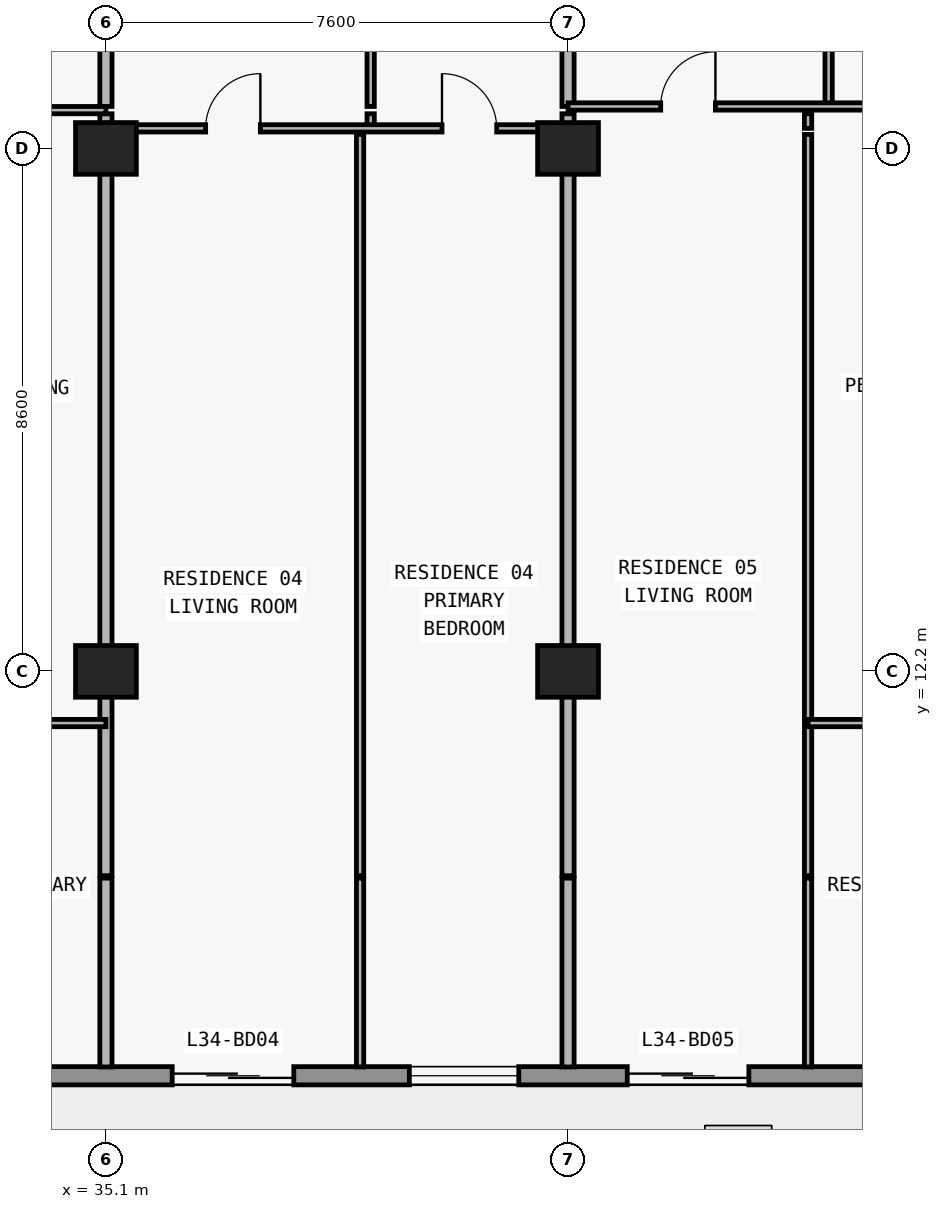
"""IFC4 building model, lengths in metres.
Left out: names, types, materials, properties, quantities, classifications, styles, units other than length and angle.
Written with IfcOpenShell. Run it as: python <this file> out.ifc"""

import sys

from ifc_helpers import new_model, si_unit, direction, frame, frame_2d, origin, origin_2d, place, context, subcontext, project, spatial, rectangle, extrude, element, fill, save


model = new_model("IFC4")
c1 = context("Model", 3, precision=1e-05, world=origin(), true_north=direction((0.0, 1.0)))
c2 = subcontext(c1, "Body", "Model", "MODEL_VIEW")
j1 = project(units=[si_unit("LENGTHUNIT", "METRE"), si_unit("PLANEANGLEUNIT", "RADIAN")], contexts=[c1])
p1 = place(None, origin())
s1 = spatial("IfcSite", under=j1, at=p1, CompositionType="ELEMENT")
p2 = place(p1, origin())
s2 = spatial("IfcBuilding", under=s1, at=p2, CompositionType="ELEMENT")
p3 = place(p2, frame((0.0, 0.0, 125.7)))
s3 = spatial("IfcBuildingStorey", under=s2, at=p3, CompositionType="ELEMENT", Elevation=125.7)
for number, where, z_axis, x_axis in (
    (1, (35.1, 12.2, 0.0), (0.0, 0.0, 1.0), (1.0, 0.0, 0.0)),
    (2, (42.7, 12.2, 0.0), (0.0, 0.0, 1.0), (1.0, 0.0, 0.0)),
    (3, (35.1, 20.8, 0.0), (0.0, 0.0, 1.0), (1.0, 0.0, 0.0)),
    (4, (42.7, 20.8, 0.0), (0.0, 0.0, 1.0), (1.0, 0.0, 0.0)),
):
    element("IfcColumn", number, at=place(p3, frame(where, z_axis=z_axis, x_axis=x_axis)), inside=s3, PredefinedType="COLUMN", context=c2, shape_type="SweptSolid", body=[
        extrude(rectangle(XDim=1.0, YDim=0.85, at=origin_2d()), origin(), (0.0, 0.0, 1.0), 3.05),
    ])
p4 = place(p3, frame((70.1, 5.55, 0.0), z_axis=(0.0, 0.0, 1.0), x_axis=(-1.0, 0.0, 0.0)))
e5 = element("IfcWall", 5, at=p4, inside=s3, PredefinedType="STANDARD", context=c2, shape_type="SweptSolid", body=[
    extrude(rectangle(XDim=62.4, YDim=0.3, at=frame_2d((31.2, 0.0))), origin(), (0.0, 0.0, 1.0), 3.05),
])
p5 = place(p4, frame((57.226, 0.0, 0.0)))
e6 = element("IfcOpeningElement", 6, at=p5, cuts=e5, PredefinedType="OPENING", context=c2, shape_type="SweptSolid", body=[
    extrude(rectangle(XDim=2.0, YDim=2.3, at=frame_2d((1.0, 1.15))), frame((0.0, 0.16, 0.0), z_axis=(0.0, -1.0, 0.0), x_axis=(1.0, 0.0, 0.0)), (0.0, 0.0, 1.0), 0.32),
])
p6 = place(p4, frame((52.926, 0.0, 0.85)))
e7 = element("IfcOpeningElement", 7, at=p6, cuts=e5, PredefinedType="OPENING", context=c2, shape_type="SweptSolid", body=[
    extrude(rectangle(XDim=2.2, YDim=1.55, at=frame_2d((1.1, 0.775))), frame((0.0, 0.16, 0.0), z_axis=(0.0, -1.0, 0.0), x_axis=(1.0, 0.0, 0.0)), (0.0, 0.0, 1.0), 0.32),
])
p7 = place(p4, frame((48.49, 0.0, 0.0)))
e8 = element("IfcOpeningElement", 8, at=p7, cuts=e5, PredefinedType="OPENING", context=c2, shape_type="SweptSolid", body=[
    extrude(rectangle(XDim=2.0, YDim=2.3, at=frame_2d((1.0, 1.15))), frame((0.0, 0.16, 0.0), z_axis=(0.0, -1.0, 0.0), x_axis=(1.0, 0.0, 0.0)), (0.0, 0.0, 1.0), 0.32),
])
p8 = place(p4, frame((44.39, 0.0, 0.85)))
e9 = element("IfcOpeningElement", 9, at=p8, cuts=e5, PredefinedType="OPENING", context=c2, shape_type="SweptSolid", body=[
    extrude(rectangle(XDim=1.8, YDim=1.55, at=frame_2d((0.9, 0.775))), frame((0.0, 0.16, 0.0), z_axis=(0.0, -1.0, 0.0), x_axis=(1.0, 0.0, 0.0)), (0.0, 0.0, 1.0), 0.32),
])
p9 = place(p4, frame((40.426, 0.0, 0.0)))
e10 = element("IfcOpeningElement", 10, at=p9, cuts=e5, PredefinedType="OPENING", context=c2, shape_type="SweptSolid", body=[
    extrude(rectangle(XDim=2.0, YDim=2.3, at=frame_2d((1.0, 1.15))), frame((0.0, 0.16, 0.0), z_axis=(0.0, -1.0, 0.0), x_axis=(1.0, 0.0, 0.0)), (0.0, 0.0, 1.0), 0.32),
])
p10 = place(p4, frame((36.126, 0.0, 0.85)))
e11 = element("IfcOpeningElement", 11, at=p10, cuts=e5, PredefinedType="OPENING", context=c2, shape_type="SweptSolid", body=[
    extrude(rectangle(XDim=2.2, YDim=1.55, at=frame_2d((1.1, 0.775))), frame((0.0, 0.16, 0.0), z_axis=(0.0, -1.0, 0.0), x_axis=(1.0, 0.0, 0.0)), (0.0, 0.0, 1.0), 0.32),
])
p11 = place(p4, frame((31.91, 0.0, 0.0)))
e12 = element("IfcOpeningElement", 12, at=p11, cuts=e5, PredefinedType="OPENING", context=c2, shape_type="SweptSolid", body=[
    extrude(rectangle(XDim=2.0, YDim=2.3, at=frame_2d((1.0, 1.15))), frame((0.0, 0.16, 0.0), z_axis=(0.0, -1.0, 0.0), x_axis=(1.0, 0.0, 0.0)), (0.0, 0.0, 1.0), 0.32),
])
p12 = place(p4, frame((28.21, 0.0, 0.85)))
e13 = element("IfcOpeningElement", 13, at=p12, cuts=e5, PredefinedType="OPENING", context=c2, shape_type="SweptSolid", body=[
    extrude(rectangle(XDim=1.8, YDim=1.55, at=frame_2d((0.9, 0.775))), frame((0.0, 0.16, 0.0), z_axis=(0.0, -1.0, 0.0), x_axis=(1.0, 0.0, 0.0)), (0.0, 0.0, 1.0), 0.32),
])
p13 = place(p4, frame((24.426, 0.0, 0.0)))
e14 = element("IfcOpeningElement", 14, at=p13, cuts=e5, PredefinedType="OPENING", context=c2, shape_type="SweptSolid", body=[
    extrude(rectangle(XDim=2.0, YDim=2.3, at=frame_2d((1.0, 1.15))), frame((0.0, 0.16, 0.0), z_axis=(0.0, -1.0, 0.0), x_axis=(1.0, 0.0, 0.0)), (0.0, 0.0, 1.0), 0.32),
])
p14 = place(p4, frame((20.126, 0.0, 0.85)))
e15 = element("IfcOpeningElement", 15, at=p14, cuts=e5, PredefinedType="OPENING", context=c2, shape_type="SweptSolid", body=[
    extrude(rectangle(XDim=2.2, YDim=1.55, at=frame_2d((1.1, 0.775))), frame((0.0, 0.16, 0.0), z_axis=(0.0, -1.0, 0.0), x_axis=(1.0, 0.0, 0.0)), (0.0, 0.0, 1.0), 0.32),
])
p15 = place(p4, frame((15.69, 0.0, 0.0)))
e16 = element("IfcOpeningElement", 16, at=p15, cuts=e5, PredefinedType="OPENING", context=c2, shape_type="SweptSolid", body=[
    extrude(rectangle(XDim=2.0, YDim=2.3, at=frame_2d((1.0, 1.15))), frame((0.0, 0.16, 0.0), z_axis=(0.0, -1.0, 0.0), x_axis=(1.0, 0.0, 0.0)), (0.0, 0.0, 1.0), 0.32),
])
p16 = place(p4, frame((11.59, 0.0, 0.85)))
e17 = element("IfcOpeningElement", 17, at=p16, cuts=e5, PredefinedType="OPENING", context=c2, shape_type="SweptSolid", body=[
    extrude(rectangle(XDim=1.8, YDim=1.55, at=frame_2d((0.9, 0.775))), frame((0.0, 0.16, 0.0), z_axis=(0.0, -1.0, 0.0), x_axis=(1.0, 0.0, 0.0)), (0.0, 0.0, 1.0), 0.32),
])
p17 = place(p4, frame((7.626, 0.0, 0.0)))
e18 = element("IfcOpeningElement", 18, at=p17, cuts=e5, PredefinedType="OPENING", context=c2, shape_type="SweptSolid", body=[
    extrude(rectangle(XDim=2.0, YDim=2.3, at=frame_2d((1.0, 1.15))), frame((0.0, 0.16, 0.0), z_axis=(0.0, -1.0, 0.0), x_axis=(1.0, 0.0, 0.0)), (0.0, 0.0, 1.0), 0.32),
])
p18 = place(p4, frame((3.326, 0.0, 0.85)))
e19 = element("IfcOpeningElement", 19, at=p18, cuts=e5, PredefinedType="OPENING", context=c2, shape_type="SweptSolid", body=[
    extrude(rectangle(XDim=2.2, YDim=1.55, at=frame_2d((1.1, 0.775))), frame((0.0, 0.16, 0.0), z_axis=(0.0, -1.0, 0.0), x_axis=(1.0, 0.0, 0.0)), (0.0, 0.0, 1.0), 0.32),
])
p19 = place(p3, frame((35.1, 5.695, 0.0), z_axis=(0.0, 0.0, 1.0), x_axis=(0.0, 1.0, 0.0)))
e20 = element("IfcWall", 20, at=p19, inside=s3, PredefinedType="PARTITIONING", context=c2, shape_type="SweptSolid", body=[
    extrude(rectangle(XDim=3.105, YDim=0.2, at=frame_2d((1.552, 0.0))), origin(), (0.0, 0.0, 1.0), 3.05),
])
p20 = place(p3, frame((35.1, 8.84, 0.0), z_axis=(0.0, 0.0, 1.0), x_axis=(0.0, 1.0, 0.0)))
e21 = element("IfcWall", 21, at=p20, inside=s3, PredefinedType="PARTITIONING", context=c2, shape_type="SweptSolid", body=[
    extrude(rectangle(XDim=12.19, YDim=0.2, at=frame_2d((6.095, 0.0))), origin(), (0.0, 0.0, 1.0), 2.174),
])
p21 = place(p3, frame((35.1, 21.13, 0.0), z_axis=(0.0, 0.0, 1.0), x_axis=(0.0, 1.0, 0.0)))
e22 = element("IfcWall", 22, at=p21, inside=s3, PredefinedType="PARTITIONING", context=c2, shape_type="SweptSolid", body=[
    extrude(rectangle(XDim=0.24, YDim=0.2, at=frame_2d((0.12, 0.0))), origin(), (0.0, 0.0, 1.0), 2.174),
])
p22 = place(p3, frame((35.1, 21.49, 0.0), z_axis=(0.0, 0.0, 1.0), x_axis=(0.0, 1.0, 0.0)))
e23 = element("IfcWall", 23, at=p22, inside=s3, PredefinedType="PARTITIONING", context=c2, shape_type="SweptSolid", body=[
    extrude(rectangle(XDim=4.69, YDim=0.2, at=frame_2d((2.345, 0.0))), origin(), (0.0, 0.0, 1.0), 2.174),
])
p23 = place(p3, frame((39.28, 5.695, 0.0), z_axis=(0.0, 0.0, 1.0), x_axis=(0.0, 1.0, 0.0)))
e24 = element("IfcWall", 24, at=p23, inside=s3, PredefinedType="PARTITIONING", context=c2, shape_type="SweptSolid", body=[
    extrude(rectangle(XDim=3.105, YDim=0.12, at=frame_2d((1.552, 0.0))), origin(), (0.0, 0.0, 1.0), 3.05),
])
p24 = place(p3, frame((39.28, 8.84, 0.0), z_axis=(0.0, 0.0, 1.0), x_axis=(0.0, 1.0, 0.0)))
e25 = element("IfcWall", 25, at=p24, inside=s3, PredefinedType="PARTITIONING", context=c2, shape_type="SweptSolid", body=[
    extrude(rectangle(XDim=12.19, YDim=0.12, at=frame_2d((6.095, 0.0))), origin(), (0.0, 0.0, 1.0), 3.05),
])
p25 = place(p3, frame((39.454, 21.13, 0.0), z_axis=(0.0, 0.0, 1.0), x_axis=(0.0, 1.0, 0.0)))
e26 = element("IfcWall", 26, at=p25, inside=s3, PredefinedType="PARTITIONING", context=c2, shape_type="SweptSolid", body=[
    extrude(rectangle(XDim=0.24, YDim=0.12, at=frame_2d((0.12, 0.0))), origin(), (0.0, 0.0, 1.0), 3.05),
])
p26 = place(p3, frame((39.454, 21.49, 0.0), z_axis=(0.0, 0.0, 1.0), x_axis=(0.0, 1.0, 0.0)))
e27 = element("IfcWall", 27, at=p26, inside=s3, PredefinedType="PARTITIONING", context=c2, shape_type="SweptSolid", body=[
    extrude(rectangle(XDim=4.69, YDim=0.12, at=frame_2d((2.345, 0.0))), origin(), (0.0, 0.0, 1.0), 3.05),
])
p27 = place(p26, frame((1.895, 0.0, 0.0)))
e28 = element("IfcOpeningElement", 28, at=p27, cuts=e27, PredefinedType="OPENING", context=c2, shape_type="SweptSolid", body=[
    extrude(rectangle(XDim=0.9, YDim=2.15, at=frame_2d((0.45, 1.075))), frame((0.0, 0.07, 0.0), z_axis=(0.0, -1.0, 0.0), x_axis=(1.0, 0.0, 0.0)), (0.0, 0.0, 1.0), 0.14),
])
p28 = place(p3, frame((42.7, 5.695, 0.0), z_axis=(0.0, 0.0, 1.0), x_axis=(0.0, 1.0, 0.0)))
e29 = element("IfcWall", 29, at=p28, inside=s3, PredefinedType="PARTITIONING", context=c2, shape_type="SweptSolid", body=[
    extrude(rectangle(XDim=3.105, YDim=0.2, at=frame_2d((1.552, 0.0))), origin(), (0.0, 0.0, 1.0), 3.05),
])
p29 = place(p3, frame((42.7, 8.84, 0.0), z_axis=(0.0, 0.0, 1.0), x_axis=(0.0, 1.0, 0.0)))
e30 = element("IfcWall", 30, at=p29, inside=s3, PredefinedType="PARTITIONING", context=c2, shape_type="SweptSolid", body=[
    extrude(rectangle(XDim=12.19, YDim=0.2, at=frame_2d((6.095, 0.0))), origin(), (0.0, 0.0, 1.0), 2.174),
])
p30 = place(p3, frame((42.7, 21.13, 0.0), z_axis=(0.0, 0.0, 1.0), x_axis=(0.0, 1.0, 0.0)))
e31 = element("IfcWall", 31, at=p30, inside=s3, PredefinedType="PARTITIONING", context=c2, shape_type="SweptSolid", body=[
    extrude(rectangle(XDim=0.24, YDim=0.2, at=frame_2d((0.12, 0.0))), origin(), (0.0, 0.0, 1.0), 2.174),
])
p31 = place(p3, frame((42.7, 21.49, 0.0), z_axis=(0.0, 0.0, 1.0), x_axis=(0.0, 1.0, 0.0)))
e32 = element("IfcWall", 32, at=p31, inside=s3, PredefinedType="PARTITIONING", context=c2, shape_type="SweptSolid", body=[
    extrude(rectangle(XDim=4.69, YDim=0.2, at=frame_2d((2.345, 0.0))), origin(), (0.0, 0.0, 1.0), 2.174),
])
p32 = place(p3, frame((46.648, 5.695, 0.0), z_axis=(0.0, 0.0, 1.0), x_axis=(0.0, 1.0, 0.0)))
e33 = element("IfcWall", 33, at=p32, inside=s3, PredefinedType="PARTITIONING", context=c2, shape_type="SweptSolid", body=[
    extrude(rectangle(XDim=3.105, YDim=0.12, at=frame_2d((1.552, 0.0))), origin(), (0.0, 0.0, 1.0), 3.05),
])
p33 = place(p3, frame((46.648, 8.84, 0.0), z_axis=(0.0, 0.0, 1.0), x_axis=(0.0, 1.0, 0.0)))
e34 = element("IfcWall", 34, at=p33, inside=s3, PredefinedType="PARTITIONING", context=c2, shape_type="SweptSolid", body=[
    extrude(rectangle(XDim=12.19, YDim=0.12, at=frame_2d((6.095, 0.0))), origin(), (0.0, 0.0, 1.0), 3.05),
])
p34 = place(p3, frame((46.648, 21.13, 0.0), z_axis=(0.0, 0.0, 1.0), x_axis=(0.0, 1.0, 0.0)))
e35 = element("IfcWall", 35, at=p34, inside=s3, PredefinedType="PARTITIONING", context=c2, shape_type="SweptSolid", body=[
    extrude(rectangle(XDim=0.24, YDim=0.12, at=frame_2d((0.12, 0.0))), origin(), (0.0, 0.0, 1.0), 3.05),
])
p35 = place(p3, frame((46.986, 21.49, 0.0), z_axis=(0.0, 0.0, 1.0), x_axis=(0.0, 1.0, 0.0)))
e36 = element("IfcWall", 36, at=p35, inside=s3, PredefinedType="PARTITIONING", context=c2, shape_type="SweptSolid", body=[
    extrude(rectangle(XDim=4.69, YDim=0.12, at=frame_2d((2.345, 0.0))), origin(), (0.0, 0.0, 1.0), 3.05),
])
p36 = place(p35, frame((1.895, 0.0, 0.0)))
e37 = element("IfcOpeningElement", 37, at=p36, cuts=e36, PredefinedType="OPENING", context=c2, shape_type="SweptSolid", body=[
    extrude(rectangle(XDim=0.9, YDim=2.15, at=frame_2d((0.45, 1.075))), frame((0.0, 0.07, 0.0), z_axis=(0.0, -1.0, 0.0), x_axis=(1.0, 0.0, 0.0)), (0.0, 0.0, 1.0), 0.14),
])
p37 = place(p3, frame((30.648, 11.35, 0.0), z_axis=(0.0, 0.0, 1.0), x_axis=(1.0, 0.0, 0.0)))
e38 = element("IfcWall", 38, at=p37, inside=s3, PredefinedType="PARTITIONING", context=c2, shape_type="SweptSolid", body=[
    extrude(rectangle(XDim=4.452, YDim=0.12, at=frame_2d((2.226, 0.0))), origin(), (0.0, 0.0, 1.0), 3.05),
])
p38 = place(p37, frame((1.776, 0.0, 0.0)))
e39 = element("IfcOpeningElement", 39, at=p38, cuts=e38, PredefinedType="OPENING", context=c2, shape_type="SweptSolid", body=[
    extrude(rectangle(XDim=0.9, YDim=2.15, at=frame_2d((0.45, 1.075))), frame((0.0, 0.07, 0.0), z_axis=(0.0, -1.0, 0.0), x_axis=(1.0, 0.0, 0.0)), (0.0, 0.0, 1.0), 0.14),
])
p39 = place(p3, frame((46.648, 11.35, 0.0), z_axis=(0.0, 0.0, 1.0), x_axis=(1.0, 0.0, 0.0)))
e40 = element("IfcWall", 40, at=p39, inside=s3, PredefinedType="PARTITIONING", context=c2, shape_type="SweptSolid", body=[
    extrude(rectangle(XDim=4.452, YDim=0.12, at=frame_2d((2.226, 0.0))), origin(), (0.0, 0.0, 1.0), 3.05),
])
p40 = place(p39, frame((1.776, 0.0, 0.0)))
e41 = element("IfcOpeningElement", 41, at=p40, cuts=e40, PredefinedType="OPENING", context=c2, shape_type="SweptSolid", body=[
    extrude(rectangle(XDim=0.9, YDim=2.15, at=frame_2d((0.45, 1.075))), frame((0.0, 0.07, 0.0), z_axis=(0.0, -1.0, 0.0), x_axis=(1.0, 0.0, 0.0)), (0.0, 0.0, 1.0), 0.14),
])
p41 = place(p3, frame((35.1, 21.13, 0.0), z_axis=(0.0, 0.0, 1.0), x_axis=(1.0, 0.0, 0.0)))
e42 = element("IfcWall", 42, at=p41, inside=s3, PredefinedType="PARTITIONING", context=c2, shape_type="SweptSolid", body=[
    extrude(rectangle(XDim=7.6, YDim=0.12, at=frame_2d((3.8, 0.0))), origin(), (0.0, 0.0, 1.0), 2.174),
])
p42 = place(p41, frame((1.64, 0.0, 0.0)))
e43 = element("IfcOpeningElement", 43, at=p42, cuts=e42, PredefinedType="OPENING", context=c2, shape_type="SweptSolid", body=[
    extrude(rectangle(XDim=0.9, YDim=2.124, at=frame_2d((0.45, 1.062))), frame((0.0, 0.07, 0.0), z_axis=(0.0, -1.0, 0.0), x_axis=(1.0, 0.0, 0.0)), (0.0, 0.0, 1.0), 0.14),
])
p43 = place(p41, frame((5.527, 0.0, 0.0)))
e44 = element("IfcOpeningElement", 44, at=p43, cuts=e42, PredefinedType="OPENING", context=c2, shape_type="SweptSolid", body=[
    extrude(rectangle(XDim=0.9, YDim=2.124, at=frame_2d((0.45, 1.062))), frame((0.0, 0.07, 0.0), z_axis=(0.0, -1.0, 0.0), x_axis=(1.0, 0.0, 0.0)), (0.0, 0.0, 1.0), 0.14),
])
p44 = place(p3, frame((26.92, 21.43, 0.0), z_axis=(0.0, 0.0, 1.0), x_axis=(1.0, 0.0, 0.0)))
e45 = element("IfcWall", 45, at=p44, inside=s3, PredefinedType="PARTITIONING", context=c2, shape_type="SweptSolid", body=[
    extrude(rectangle(XDim=8.18, YDim=0.12, at=frame_2d((4.09, 0.0))), origin(), (0.0, 0.0, 1.0), 3.05),
])
p45 = place(p44, frame((1.414, 0.0, 0.0)))
e46 = element("IfcOpeningElement", 46, at=p45, cuts=e45, PredefinedType="OPENING", context=c2, shape_type="SweptSolid", body=[
    extrude(rectangle(XDim=0.9, YDim=2.15, at=frame_2d((0.45, 1.075))), frame((0.0, 0.07, 0.0), z_axis=(0.0, -1.0, 0.0), x_axis=(1.0, 0.0, 0.0)), (0.0, 0.0, 1.0), 0.14),
])
p46 = place(p44, frame((5.798, 0.0, 0.0)))
e47 = element("IfcOpeningElement", 47, at=p46, cuts=e45, PredefinedType="OPENING", context=c2, shape_type="SweptSolid", body=[
    extrude(rectangle(XDim=0.9, YDim=2.15, at=frame_2d((0.45, 1.075))), frame((0.0, 0.07, 0.0), z_axis=(0.0, -1.0, 0.0), x_axis=(1.0, 0.0, 0.0)), (0.0, 0.0, 1.0), 0.14),
])
p47 = place(p3, frame((42.7, 21.49, 0.0), z_axis=(0.0, 0.0, 1.0), x_axis=(1.0, 0.0, 0.0)))
e48 = element("IfcWall", 48, at=p47, inside=s3, PredefinedType="PARTITIONING", context=c2, shape_type="SweptSolid", body=[
    extrude(rectangle(XDim=8.18, YDim=0.12, at=frame_2d((4.09, 0.0))), origin(), (0.0, 0.0, 1.0), 3.05),
])
p48 = place(p47, frame((1.524, 0.0, 0.0)))
e49 = element("IfcOpeningElement", 49, at=p48, cuts=e48, PredefinedType="OPENING", context=c2, shape_type="SweptSolid", body=[
    extrude(rectangle(XDim=0.9, YDim=2.15, at=frame_2d((0.45, 1.075))), frame((0.0, 0.07, 0.0), z_axis=(0.0, -1.0, 0.0), x_axis=(1.0, 0.0, 0.0)), (0.0, 0.0, 1.0), 0.14),
])
p49 = place(p47, frame((5.783, 0.0, 0.0)))
e50 = element("IfcOpeningElement", 50, at=p49, cuts=e48, PredefinedType="OPENING", context=c2, shape_type="SweptSolid", body=[
    extrude(rectangle(XDim=0.9, YDim=2.15, at=frame_2d((0.45, 1.075))), frame((0.0, 0.07, 0.0), z_axis=(0.0, -1.0, 0.0), x_axis=(1.0, 0.0, 0.0)), (0.0, 0.0, 1.0), 0.14),
])
p50 = place(p11, origin())
e51 = element("IfcDoor", 51, at=p50, inside=s3, OperationType="DOUBLE_DOOR_SLIDING", PredefinedType="DOOR", context=c2, shape_type="SweptSolid", body=[
    extrude(rectangle(XDim=2.0, YDim=2.3, at=frame_2d((1.0, 1.15))), frame((0.0, 0.025, 0.0), z_axis=(0.0, -1.0, 0.0), x_axis=(1.0, 0.0, 0.0)), (0.0, 0.0, 1.0), 0.05),
])
fill(e12, e51)
p51 = place(p12, origin())
e52 = element("IfcWindow", 52, at=p51, inside=s3, PartitioningType="SINGLE_PANEL", PredefinedType="WINDOW", context=c2, shape_type="SweptSolid", body=[
    extrude(rectangle(XDim=1.8, YDim=1.55, at=frame_2d((0.9, 0.775))), frame((0.0, 0.03, 0.0), z_axis=(0.0, -1.0, 0.0), x_axis=(1.0, 0.0, 0.0)), (0.0, 0.0, 1.0), 0.06),
])
fill(e13, e52)
p52 = place(p13, origin())
e53 = element("IfcDoor", 53, at=p52, inside=s3, OperationType="DOUBLE_DOOR_SLIDING", PredefinedType="DOOR", context=c2, shape_type="SweptSolid", body=[
    extrude(rectangle(XDim=2.0, YDim=2.3, at=frame_2d((1.0, 1.15))), frame((0.0, 0.025, 0.0), z_axis=(0.0, -1.0, 0.0), x_axis=(1.0, 0.0, 0.0)), (0.0, 0.0, 1.0), 0.05),
])
fill(e14, e53)
p53 = place(p42, origin())
e54 = element("IfcDoor", 54, at=p53, inside=s3, OperationType="SINGLE_SWING_RIGHT", PredefinedType="DOOR", context=c2, shape_type="SweptSolid", body=[
    extrude(rectangle(XDim=0.9, YDim=2.124, at=frame_2d((0.45, 1.062))), frame((0.0, 0.025, 0.0), z_axis=(0.0, -1.0, 0.0), x_axis=(1.0, 0.0, 0.0)), (0.0, 0.0, 1.0), 0.05),
])
fill(e43, e54)
p54 = place(p43, origin())
e55 = element("IfcDoor", 55, at=p54, inside=s3, OperationType="SINGLE_SWING_LEFT", PredefinedType="DOOR", context=c2, shape_type="SweptSolid", body=[
    extrude(rectangle(XDim=0.9, YDim=2.124, at=frame_2d((0.45, 1.062))), frame((0.0, 0.025, 0.0), z_axis=(0.0, -1.0, 0.0), x_axis=(1.0, 0.0, 0.0)), (0.0, 0.0, 1.0), 0.05),
])
fill(e44, e55)
p55 = place(p48, origin())
e56 = element("IfcDoor", 56, at=p55, inside=s3, OperationType="SINGLE_SWING_RIGHT", PredefinedType="DOOR", context=c2, shape_type="SweptSolid", body=[
    extrude(rectangle(XDim=0.9, YDim=2.15, at=frame_2d((0.45, 1.075))), frame((0.0, 0.025, 0.0), z_axis=(0.0, -1.0, 0.0), x_axis=(1.0, 0.0, 0.0)), (0.0, 0.0, 1.0), 0.05),
])
fill(e49, e56)
save(model, sys.argv[1])
